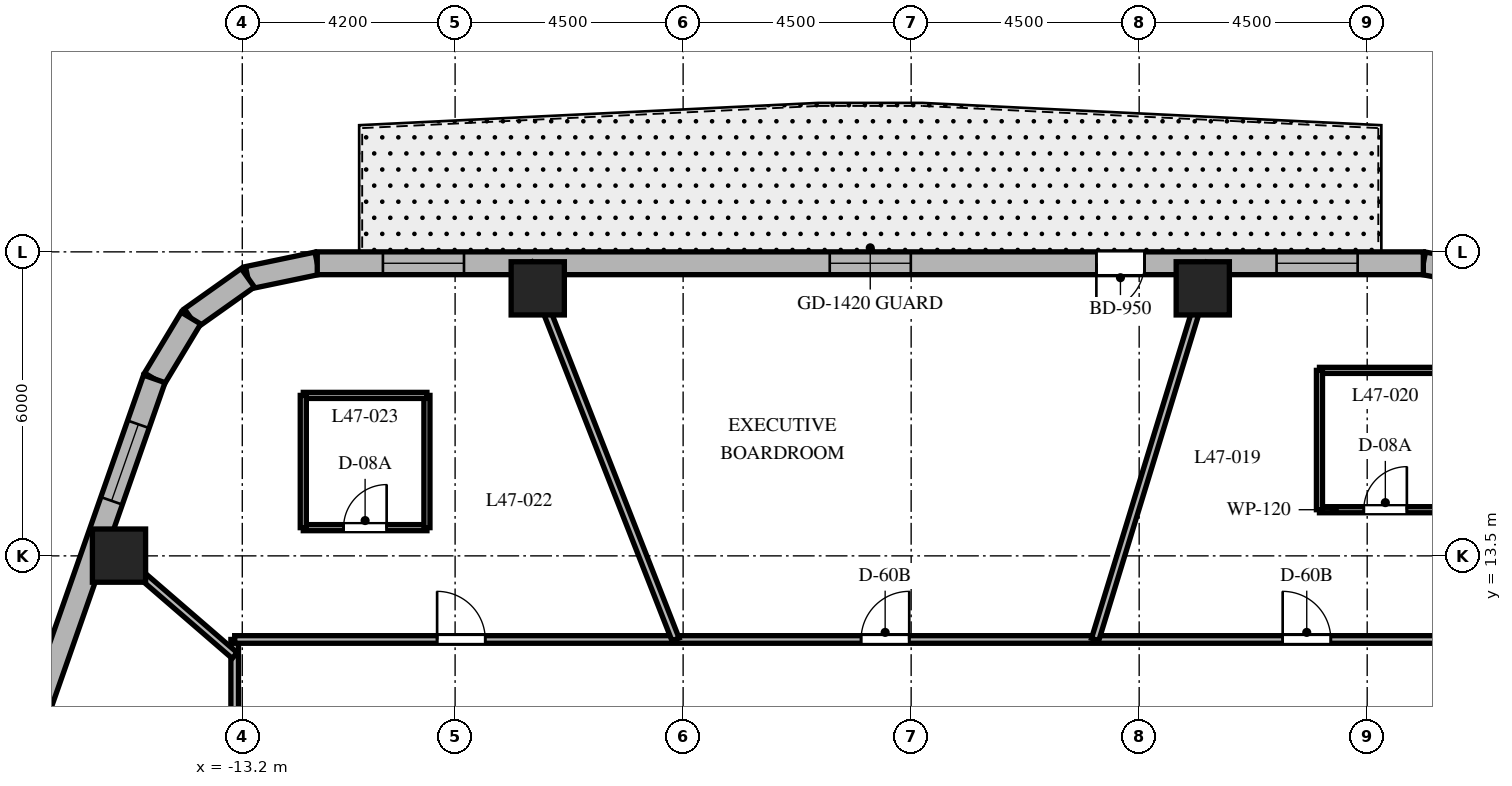
"""IFC4 building model, lengths in metres.
Left out: names, types, materials, properties, quantities, classifications, styles, units other than length and angle.
Written with IfcOpenShell. Run it as: python <this file> out.ifc"""

import sys

from ifc_helpers import new_model, si_unit, direction, frame, frame_2d, origin, origin_2d, place, context, subcontext, project, spatial, rectangle, extrude, element, fill, save


model = new_model("IFC4")
c1 = context("Model", 3, precision=1e-05, world=origin(), true_north=direction((0.0, 1.0)))
c2 = subcontext(c1, "Body", "Model", "MODEL_VIEW")
j1 = project(units=[si_unit("LENGTHUNIT", "METRE"), si_unit("PLANEANGLEUNIT", "RADIAN")], contexts=[c1])
p1 = place(None, origin())
s1 = spatial("IfcSite", under=j1, at=p1, CompositionType="ELEMENT")
p2 = place(p1, origin())
s2 = spatial("IfcBuilding", under=s1, at=p2, CompositionType="ELEMENT")
p3 = place(p2, frame((0.0, 0.0, 190.4)))
s3 = spatial("IfcBuildingStorey", under=s2, at=p3, CompositionType="ELEMENT", Elevation=190.4)
for number, where, z_axis, x_axis in (
    (1, (5.755, 18.78, 0.0), (0.0, 0.0, 1.0), (1.0, 0.0, 0.0)),
    (2, (-7.369, 18.78, 0.0), (0.0, 0.0, 1.0), (1.0, 0.0, 0.0)),
    (3, (-15.633, 13.505, 0.0), (0.0, 0.0, 1.0), (1.0, 0.0, 0.0)),
):
    element("IfcColumn", number, at=place(p3, frame(where, z_axis=z_axis, x_axis=x_axis)), inside=s3, PredefinedType="COLUMN", context=c2, shape_type="SweptSolid", body=[
        extrude(rectangle(XDim=1.05, YDim=1.05, at=origin_2d()), origin(), (0.0, 0.0, 1.0), 3.7),
    ])
p4 = place(p3, frame((11.349, 19.043, 0.0), z_axis=(0.0, 0.0, 1.0), x_axis=(-0.982931267051, 0.183973161772, 0.0)))
e4 = element("IfcWall", 4, at=p4, inside=s3, PredefinedType="SOLIDWALL", context=c2, shape_type="SweptSolid", body=[
    extrude(rectangle(XDim=1.262, YDim=0.45, at=frame_2d((0.631, 0.0))), origin(), (0.0, 0.0, 1.0), 3.4),
])
p5 = place(p3, frame((-11.72, 19.275, 0.0), z_axis=(0.0, 0.0, 1.0), x_axis=(-0.97893106758, -0.204191001093, 0.0)))
e5 = element("IfcWall", 5, at=p5, inside=s3, PredefinedType="SOLIDWALL", context=c2, shape_type="SweptSolid", body=[
    extrude(rectangle(XDim=1.4, YDim=0.45, at=frame_2d((0.7, 0.0))), origin(), (0.0, 0.0, 1.0), 3.4),
])
p6 = place(p3, frame((-13.091, 18.989, 0.0), z_axis=(0.0, 0.0, 1.0), x_axis=(-0.815574637848, -0.578651890258, 0.0)))
e6 = element("IfcWall", 6, at=p6, inside=s3, PredefinedType="SOLIDWALL", context=c2, shape_type="SweptSolid", body=[
    extrude(rectangle(XDim=1.377, YDim=0.45, at=frame_2d((0.688, 0.0))), origin(), (0.0, 0.0, 1.0), 3.4),
])
p7 = place(p3, frame((-14.214, 18.192, 0.0), z_axis=(0.0, 0.0, 1.0), x_axis=(-0.516340945502, -0.856383108193, 0.0)))
e7 = element("IfcWall", 7, at=p7, inside=s3, PredefinedType="SOLIDWALL", context=c2, shape_type="SweptSolid", body=[
    extrude(rectangle(XDim=1.4, YDim=0.45, at=frame_2d((0.7, 0.0))), origin(), (0.0, 0.0, 1.0), 3.4),
])
p8 = place(p3, frame((10.108, 19.275, 0.0), z_axis=(0.0, 0.0, 1.0), x_axis=(-1.0, 0.0, 0.0)))
e8 = element("IfcWall", 8, at=p8, inside=s3, PredefinedType="SOLIDWALL", context=c2, shape_type="SweptSolid", body=[
    extrude(rectangle(XDim=21.829, YDim=0.45, at=frame_2d((10.915, 0.0))), origin(), (0.0, 0.0, 1.0), 3.4),
])
p9 = place(p8, frame((5.503, 0.0, 0.0)))
e9 = element("IfcOpeningElement", 9, at=p9, cuts=e8, PredefinedType="OPENING", context=c2, shape_type="SweptSolid", body=[
    extrude(rectangle(XDim=0.95, YDim=2.15, at=frame_2d((0.475, 1.075))), frame((0.0, 0.235, 0.0), z_axis=(0.0, -1.0, 0.0), x_axis=(1.0, 0.0, 0.0)), (0.0, 0.0, 1.0), 0.47),
])
p10 = place(p8, frame((1.297, 0.0, 0.8)))
e10 = element("IfcOpeningElement", 10, at=p10, cuts=e8, PredefinedType="OPENING", context=c2, shape_type="SweptSolid", body=[
    extrude(rectangle(XDim=1.6, YDim=1.75, at=frame_2d((0.8, 0.875))), frame((0.0, 0.235, 0.0), z_axis=(0.0, -1.0, 0.0), x_axis=(1.0, 0.0, 0.0)), (0.0, 0.0, 1.0), 0.47),
])
p11 = place(p8, frame((10.115, 0.0, 0.8)))
e11 = element("IfcOpeningElement", 11, at=p11, cuts=e8, PredefinedType="OPENING", context=c2, shape_type="SweptSolid", body=[
    extrude(rectangle(XDim=1.6, YDim=1.75, at=frame_2d((0.8, 0.875))), frame((0.0, 0.235, 0.0), z_axis=(0.0, -1.0, 0.0), x_axis=(1.0, 0.0, 0.0)), (0.0, 0.0, 1.0), 0.47),
])
p12 = place(p8, frame((18.933, 0.0, 0.8)))
e12 = element("IfcOpeningElement", 12, at=p12, cuts=e8, PredefinedType="OPENING", context=c2, shape_type="SweptSolid", body=[
    extrude(rectangle(XDim=1.6, YDim=1.75, at=frame_2d((0.8, 0.875))), frame((0.0, 0.235, 0.0), z_axis=(0.0, -1.0, 0.0), x_axis=(1.0, 0.0, 0.0)), (0.0, 0.0, 1.0), 0.47),
])
p13 = place(p3, frame((-14.937, 16.993, 0.0), z_axis=(0.0, 0.0, 1.0), x_axis=(-0.330431575061, -0.943829949834, 0.0)))
e13 = element("IfcWall", 13, at=p13, inside=s3, PredefinedType="SOLIDWALL", context=c2, shape_type="SweptSolid", body=[
    extrude(rectangle(XDim=17.689, YDim=0.45, at=frame_2d((8.844, 0.0))), origin(), (0.0, 0.0, 1.0), 3.4),
])
p14 = place(p13, frame((0.95, 0.0, 0.8)))
e14 = element("IfcOpeningElement", 14, at=p14, cuts=e13, PredefinedType="OPENING", context=c2, shape_type="SweptSolid", body=[
    extrude(rectangle(XDim=1.6, YDim=1.75, at=frame_2d((0.8, 0.875))), frame((0.0, 0.235, 0.0), z_axis=(0.0, -1.0, 0.0), x_axis=(1.0, 0.0, 0.0)), (0.0, 0.0, 1.0), 0.47),
])
p15 = place(p13, frame((7.99, 0.0, 0.8)))
e15 = element("IfcOpeningElement", 15, at=p15, cuts=e13, PredefinedType="OPENING", context=c2, shape_type="SweptSolid", body=[
    extrude(rectangle(XDim=1.6, YDim=1.75, at=frame_2d((0.8, 0.875))), frame((0.0, 0.235, 0.0), z_axis=(0.0, -1.0, 0.0), x_axis=(1.0, 0.0, 0.0)), (0.0, 0.0, 1.0), 0.47),
])
p16 = place(p13, frame((15.084, 0.0, 0.8)))
e16 = element("IfcOpeningElement", 16, at=p16, cuts=e13, PredefinedType="OPENING", context=c2, shape_type="SweptSolid", body=[
    extrude(rectangle(XDim=1.6, YDim=1.75, at=frame_2d((0.8, 0.875))), frame((0.0, 0.235, 0.0), z_axis=(0.0, -1.0, 0.0), x_axis=(1.0, 0.0, 0.0)), (0.0, 0.0, 1.0), 0.47),
])
p17 = place(p3, frame((-13.35, -11.85, 0.0), z_axis=(0.0, 0.0, 1.0), x_axis=(0.0, 1.0, 0.0)))
e17 = element("IfcWall", 17, at=p17, inside=s3, PredefinedType="PARTITIONING", context=c2, shape_type="SweptSolid", body=[
    extrude(rectangle(XDim=23.7, YDim=0.15, at=frame_2d((11.85, 0.0))), origin(), (0.0, 0.0, 1.0), 2.84),
])
p18 = place(p17, frame((18.389, 0.0, 0.0)))
e18 = element("IfcOpeningElement", 18, at=p18, cuts=e17, PredefinedType="OPENING", context=c2, shape_type="SweptSolid", body=[
    extrude(rectangle(XDim=0.95, YDim=2.03, at=frame_2d((0.475, 1.015))), frame((0.0, 0.085, 0.0), z_axis=(0.0, -1.0, 0.0), x_axis=(1.0, 0.0, 0.0)), (0.0, 0.0, 1.0), 0.17),
])
p19 = place(p17, frame((10.751, 0.0, 0.0)))
e19 = element("IfcOpeningElement", 19, at=p19, cuts=e17, PredefinedType="OPENING", context=c2, shape_type="SweptSolid", body=[
    extrude(rectangle(XDim=0.95, YDim=2.03, at=frame_2d((0.475, 1.015))), frame((0.0, 0.085, 0.0), z_axis=(0.0, -1.0, 0.0), x_axis=(1.0, 0.0, 0.0)), (0.0, 0.0, 1.0), 0.17),
])
p20 = place(p17, frame((3.74, 0.0, 0.0)))
e20 = element("IfcOpeningElement", 20, at=p20, cuts=e17, PredefinedType="OPENING", context=c2, shape_type="SweptSolid", body=[
    extrude(rectangle(XDim=0.95, YDim=2.03, at=frame_2d((0.475, 1.015))), frame((0.0, 0.085, 0.0), z_axis=(0.0, -1.0, 0.0), x_axis=(1.0, 0.0, 0.0)), (0.0, 0.0, 1.0), 0.17),
])
p21 = place(p3, frame((-13.35, 11.85, 0.0), z_axis=(0.0, 0.0, 1.0), x_axis=(1.0, 0.0, 0.0)))
e21 = element("IfcWall", 21, at=p21, inside=s3, PredefinedType="PARTITIONING", context=c2, shape_type="SweptSolid", body=[
    extrude(rectangle(XDim=26.7, YDim=0.15, at=frame_2d((13.35, 0.0))), origin(), (0.0, 0.0, 1.0), 2.84),
])
p22 = place(p21, frame((20.682, 0.0, 0.0)))
e22 = element("IfcOpeningElement", 22, at=p22, cuts=e21, PredefinedType="OPENING", context=c2, shape_type="SweptSolid", body=[
    extrude(rectangle(XDim=0.95, YDim=2.03, at=frame_2d((0.475, 1.015))), frame((0.0, 0.085, 0.0), z_axis=(0.0, -1.0, 0.0), x_axis=(1.0, 0.0, 0.0)), (0.0, 0.0, 1.0), 0.17),
])
p23 = place(p21, frame((12.362, 0.0, 0.0)))
e23 = element("IfcOpeningElement", 23, at=p23, cuts=e21, PredefinedType="OPENING", context=c2, shape_type="SweptSolid", body=[
    extrude(rectangle(XDim=0.95, YDim=2.03, at=frame_2d((0.475, 1.015))), frame((0.0, 0.085, 0.0), z_axis=(0.0, -1.0, 0.0), x_axis=(1.0, 0.0, 0.0)), (0.0, 0.0, 1.0), 0.17),
])
p24 = place(p21, frame((3.995, 0.0, 0.0)))
e24 = element("IfcOpeningElement", 24, at=p24, cuts=e21, PredefinedType="OPENING", context=c2, shape_type="SweptSolid", body=[
    extrude(rectangle(XDim=0.95, YDim=2.03, at=frame_2d((0.475, 1.015))), frame((0.0, 0.085, 0.0), z_axis=(0.0, -1.0, 0.0), x_axis=(1.0, 0.0, 0.0)), (0.0, 0.0, 1.0), 0.17),
])
p25 = place(p3, frame((3.631, 11.85, 0.0), z_axis=(0.0, 0.0, 1.0), x_axis=(0.293007573338, 0.956110120209, 0.0)))
e25 = element("IfcWall", 25, at=p25, inside=s3, PredefinedType="PARTITIONING", context=c2, shape_type="SweptSolid", body=[
    extrude(rectangle(XDim=7.766, YDim=0.15, at=frame_2d((3.883, 0.0))), origin(), (0.0, 0.0, 1.0), 2.64),
])
p26 = place(p3, frame((-4.65, 11.85, 0.0), z_axis=(0.0, 0.0, 1.0), x_axis=(-0.365265947993, 0.930903210456, 0.0)))
e26 = element("IfcWall", 26, at=p26, inside=s3, PredefinedType="PARTITIONING", context=c2, shape_type="SweptSolid", body=[
    extrude(rectangle(XDim=7.976, YDim=0.15, at=frame_2d((3.988, 0.0))), origin(), (0.0, 0.0, 1.0), 2.64),
])
p27 = place(p3, frame((-13.35, 11.533, 0.0), z_axis=(0.0, 0.0, 1.0), x_axis=(-0.756711647314, 0.65374879183, 0.0)))
e27 = element("IfcWall", 27, at=p27, inside=s3, PredefinedType="PARTITIONING", context=c2, shape_type="SweptSolid", body=[
    extrude(rectangle(XDim=3.55, YDim=0.15, at=frame_2d((1.775, 0.0))), origin(), (0.0, 0.0, 1.0), 2.64),
])
p28 = place(p3, frame((8.058, 14.411, 0.0), z_axis=(0.0, 0.0, 1.0), x_axis=(1.0, 0.0, 0.0)))
e28 = element("IfcWall", 28, at=p28, inside=s3, PredefinedType="PARTITIONING", context=c2, shape_type="SweptSolid", body=[
    extrude(rectangle(XDim=2.6, YDim=0.12, at=frame_2d((1.3, 0.0))), origin(), (0.0, 0.0, 1.0), 3.4),
])
p29 = place(p28, frame((0.875, 0.0, 0.0)))
e29 = element("IfcOpeningElement", 29, at=p29, cuts=e28, PredefinedType="OPENING", context=c2, shape_type="SweptSolid", body=[
    extrude(rectangle(XDim=0.85, YDim=2.03, at=frame_2d((0.425, 1.015))), frame((0.0, 0.07, 0.0), z_axis=(0.0, -1.0, 0.0), x_axis=(1.0, 0.0, 0.0)), (0.0, 0.0, 1.0), 0.14),
])
p30 = place(p3, frame((10.658, 17.161, 0.0), z_axis=(0.0, 0.0, 1.0), x_axis=(-1.0, 0.0, 0.0)))
e30 = element("IfcWall", 30, at=p30, inside=s3, PredefinedType="PARTITIONING", context=c2, shape_type="SweptSolid", body=[
    extrude(rectangle(XDim=2.6, YDim=0.12, at=frame_2d((1.3, 0.0))), origin(), (0.0, 0.0, 1.0), 2.64),
])
p31 = place(p3, frame((8.058, 17.161, 0.0), z_axis=(0.0, 0.0, 1.0), x_axis=(0.0, -1.0, 0.0)))
e31 = element("IfcWall", 31, at=p31, inside=s3, PredefinedType="PARTITIONING", context=c2, shape_type="SweptSolid", body=[
    extrude(rectangle(XDim=2.75, YDim=0.12, at=frame_2d((1.375, 0.0))), origin(), (0.0, 0.0, 1.0), 3.4),
])
p32 = place(p3, frame((-11.996, 14.057, 0.0), z_axis=(0.0, 0.0, 1.0), x_axis=(1.0, 0.0, 0.0)))
e32 = element("IfcWall", 32, at=p32, inside=s3, PredefinedType="PARTITIONING", context=c2, shape_type="SweptSolid", body=[
    extrude(rectangle(XDim=2.44, YDim=0.12, at=frame_2d((1.22, 0.0))), origin(), (0.0, 0.0, 1.0), 2.927),
])
p33 = place(p32, frame((0.795, 0.0, 0.0)))
e33 = element("IfcOpeningElement", 33, at=p33, cuts=e32, PredefinedType="OPENING", context=c2, shape_type="SweptSolid", body=[
    extrude(rectangle(XDim=0.85, YDim=2.03, at=frame_2d((0.425, 1.015))), frame((0.0, 0.07, 0.0), z_axis=(0.0, -1.0, 0.0), x_axis=(1.0, 0.0, 0.0)), (0.0, 0.0, 1.0), 0.14),
])
p34 = place(p3, frame((-9.556, 14.057, 0.0), z_axis=(0.0, 0.0, 1.0), x_axis=(0.0, 1.0, 0.0)))
e34 = element("IfcWall", 34, at=p34, inside=s3, PredefinedType="PARTITIONING", context=c2, shape_type="SweptSolid", body=[
    extrude(rectangle(XDim=2.61, YDim=0.12, at=frame_2d((1.305, 0.0))), origin(), (0.0, 0.0, 1.0), 2.927),
])
p35 = place(p3, frame((-9.556, 16.667, 0.0), z_axis=(0.0, 0.0, 1.0), x_axis=(-1.0, 0.0, 0.0)))
e35 = element("IfcWall", 35, at=p35, inside=s3, PredefinedType="PARTITIONING", context=c2, shape_type="SweptSolid", body=[
    extrude(rectangle(XDim=2.44, YDim=0.12, at=frame_2d((1.22, 0.0))), origin(), (0.0, 0.0, 1.0), 2.64),
])
p36 = place(p3, frame((-11.996, 16.667, 0.0), z_axis=(0.0, 0.0, 1.0), x_axis=(0.0, -1.0, 0.0)))
e36 = element("IfcWall", 36, at=p36, inside=s3, PredefinedType="PARTITIONING", context=c2, shape_type="SweptSolid", body=[
    extrude(rectangle(XDim=2.61, YDim=0.12, at=frame_2d((1.305, 0.0))), origin(), (0.0, 0.0, 1.0), 2.64),
])
p37 = place(p9, origin())
e37 = element("IfcDoor", 37, at=p37, inside=s3, OperationType="SINGLE_SWING_RIGHT", PredefinedType="DOOR", context=c2, shape_type="SweptSolid", body=[
    extrude(rectangle(XDim=0.95, YDim=2.15, at=frame_2d((0.475, 1.075))), frame((0.0, 0.025, 0.0), z_axis=(0.0, -1.0, 0.0), x_axis=(1.0, 0.0, 0.0)), (0.0, 0.0, 1.0), 0.05),
])
fill(e9, e37)
p38 = place(p10, origin())
e38 = element("IfcWindow", 38, at=p38, inside=s3, PartitioningType="SINGLE_PANEL", PredefinedType="WINDOW", context=c2, shape_type="SweptSolid", body=[
    extrude(rectangle(XDim=1.6, YDim=1.75, at=frame_2d((0.8, 0.875))), frame((0.0, 0.03, 0.0), z_axis=(0.0, -1.0, 0.0), x_axis=(1.0, 0.0, 0.0)), (0.0, 0.0, 1.0), 0.06),
])
fill(e10, e38)
p39 = place(p11, origin())
e39 = element("IfcWindow", 39, at=p39, inside=s3, PartitioningType="SINGLE_PANEL", PredefinedType="WINDOW", context=c2, shape_type="SweptSolid", body=[
    extrude(rectangle(XDim=1.6, YDim=1.75, at=frame_2d((0.8, 0.875))), frame((0.0, 0.03, 0.0), z_axis=(0.0, -1.0, 0.0), x_axis=(1.0, 0.0, 0.0)), (0.0, 0.0, 1.0), 0.06),
])
fill(e11, e39)
p40 = place(p12, origin())
e40 = element("IfcWindow", 40, at=p40, inside=s3, PartitioningType="SINGLE_PANEL", PredefinedType="WINDOW", context=c2, shape_type="SweptSolid", body=[
    extrude(rectangle(XDim=1.6, YDim=1.75, at=frame_2d((0.8, 0.875))), frame((0.0, 0.03, 0.0), z_axis=(0.0, -1.0, 0.0), x_axis=(1.0, 0.0, 0.0)), (0.0, 0.0, 1.0), 0.06),
])
fill(e12, e40)
p41 = place(p14, origin())
e41 = element("IfcWindow", 41, at=p41, inside=s3, PartitioningType="SINGLE_PANEL", PredefinedType="WINDOW", context=c2, shape_type="SweptSolid", body=[
    extrude(rectangle(XDim=1.6, YDim=1.75, at=frame_2d((0.8, 0.875))), frame((0.0, 0.03, 0.0), z_axis=(0.0, -1.0, 0.0), x_axis=(1.0, 0.0, 0.0)), (0.0, 0.0, 1.0), 0.06),
])
fill(e14, e41)
p42 = place(p22, origin())
e42 = element("IfcDoor", 42, at=p42, inside=s3, OperationType="SINGLE_SWING_LEFT", PredefinedType="DOOR", context=c2, shape_type="SweptSolid", body=[
    extrude(rectangle(XDim=0.95, YDim=2.03, at=frame_2d((0.475, 1.015))), frame((0.0, 0.025, 0.0), z_axis=(0.0, -1.0, 0.0), x_axis=(1.0, 0.0, 0.0)), (0.0, 0.0, 1.0), 0.05),
])
fill(e22, e42)
p43 = place(p29, origin())
e43 = element("IfcDoor", 43, at=p43, inside=s3, OperationType="SINGLE_SWING_RIGHT", PredefinedType="DOOR", context=c2, shape_type="SweptSolid", body=[
    extrude(rectangle(XDim=0.85, YDim=2.03, at=frame_2d((0.425, 1.015))), frame((0.0, 0.025, 0.0), z_axis=(0.0, -1.0, 0.0), x_axis=(1.0, 0.0, 0.0)), (0.0, 0.0, 1.0), 0.05),
])
fill(e29, e43)
p44 = place(p23, origin())
e44 = element("IfcDoor", 44, at=p44, inside=s3, OperationType="SINGLE_SWING_RIGHT", PredefinedType="DOOR", context=c2, shape_type="SweptSolid", body=[
    extrude(rectangle(XDim=0.95, YDim=2.03, at=frame_2d((0.475, 1.015))), frame((0.0, 0.025, 0.0), z_axis=(0.0, -1.0, 0.0), x_axis=(1.0, 0.0, 0.0)), (0.0, 0.0, 1.0), 0.05),
])
fill(e23, e44)
p45 = place(p24, origin())
e45 = element("IfcDoor", 45, at=p45, inside=s3, OperationType="SINGLE_SWING_LEFT", PredefinedType="DOOR", context=c2, shape_type="SweptSolid", body=[
    extrude(rectangle(XDim=0.95, YDim=2.03, at=frame_2d((0.475, 1.015))), frame((0.0, 0.025, 0.0), z_axis=(0.0, -1.0, 0.0), x_axis=(1.0, 0.0, 0.0)), (0.0, 0.0, 1.0), 0.05),
])
fill(e24, e45)
p46 = place(p33, origin())
e46 = element("IfcDoor", 46, at=p46, inside=s3, OperationType="SINGLE_SWING_RIGHT", PredefinedType="DOOR", context=c2, shape_type="SweptSolid", body=[
    extrude(rectangle(XDim=0.85, YDim=2.03, at=frame_2d((0.425, 1.015))), frame((0.0, 0.025, 0.0), z_axis=(0.0, -1.0, 0.0), x_axis=(1.0, 0.0, 0.0)), (0.0, 0.0, 1.0), 0.05),
])
fill(e33, e46)
save(model, sys.argv[1])
